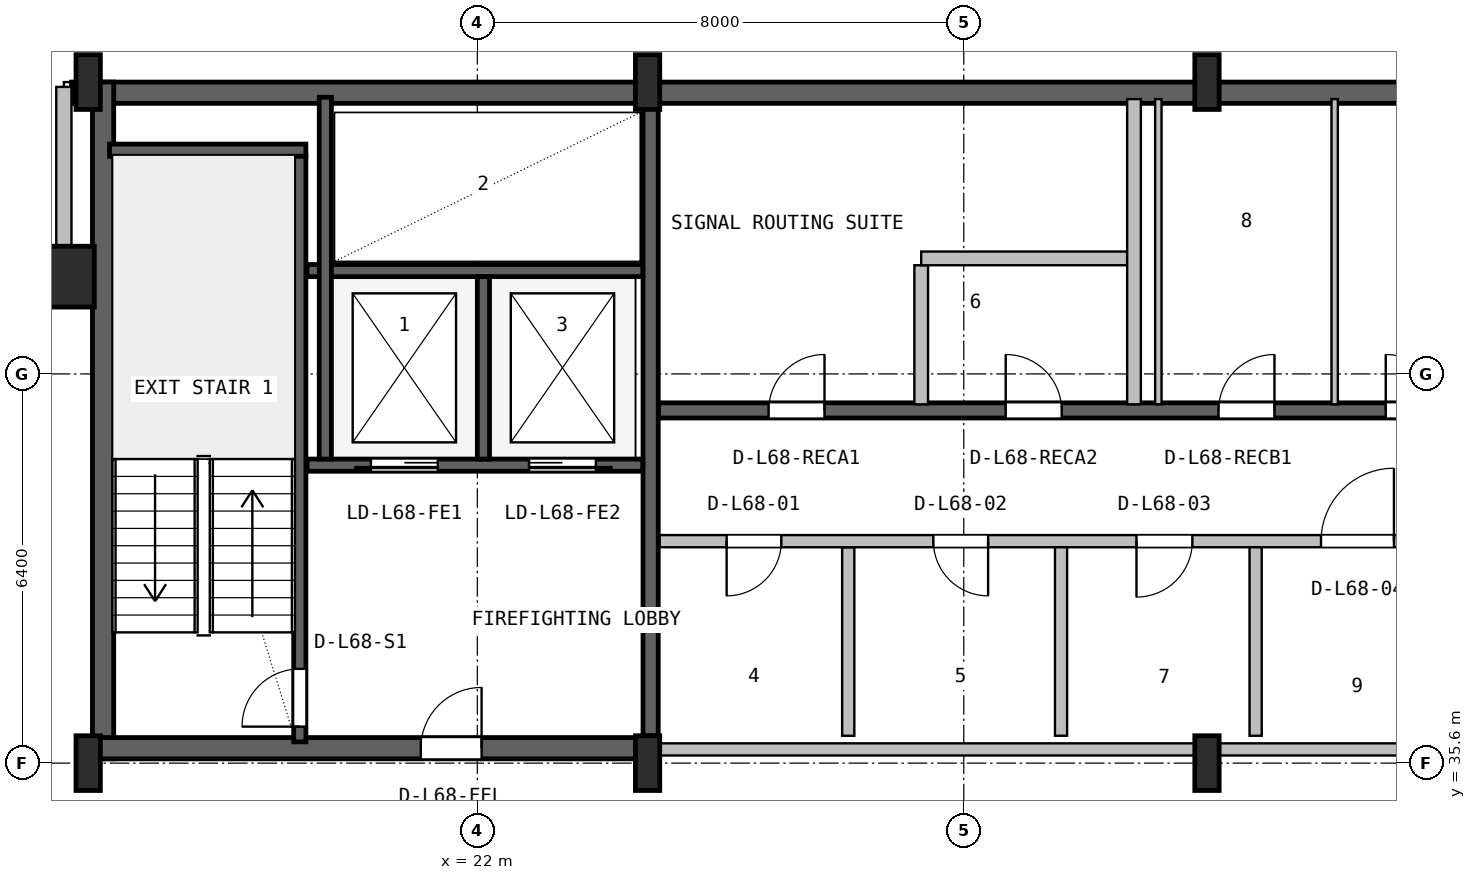
"""IFC4 building model, lengths in metres.
Left out: names, types, materials, properties, quantities, classifications, styles, units other than length and angle.
Written with IfcOpenShell. Run it as: python <this file> out.ifc"""

import sys

from ifc_helpers import new_model, si_unit, direction, frame, frame_2d, origin, origin_2d, place, context, subcontext, project, spatial, rectangle, hollow_rectangle, i_section, extrude, source, transform, mapped, element, fill, save


model = new_model("IFC4")
c1 = context("Model", 3, precision=1e-05, world=origin(), true_north=direction((0.0, 1.0)))
c2 = subcontext(c1, "Body", "Model", "MODEL_VIEW")
j1 = project(units=[si_unit("LENGTHUNIT", "METRE"), si_unit("PLANEANGLEUNIT", "RADIAN")], contexts=[c1])
p1 = place(None, origin())
s1 = spatial("IfcSite", under=j1, at=p1, CompositionType="ELEMENT")
p2 = place(p1, origin())
s2 = spatial("IfcBuilding", under=s1, at=p2, CompositionType="ELEMENT")
p3 = place(p2, frame((0.0, 0.0, 273.6)))
s3 = spatial("IfcBuildingStorey", under=s2, at=p3, CompositionType="ELEMENT", Elevation=273.6)
p4 = place(p3, frame((15.325, 46.625, 0.0), z_axis=(0.0, 0.0, 1.0), x_axis=(1.0, 0.0, 0.0)))
e1 = element("IfcWall", 1, at=p4, inside=s3, PredefinedType="SHEAR", context=c2, shape_type="SweptSolid", body=[
    extrude(rectangle(XDim=37.35, YDim=0.35, at=frame_2d((18.675, 0.0))), origin(), (0.0, 0.0, 1.0), 3.55),
])
p5 = place(p3, frame((15.845, 35.67, 0.0), z_axis=(0.0, 0.0, 1.0), x_axis=(0.0, 1.0, 0.0)))
e2 = element("IfcWall", 2, at=p5, inside=s3, PredefinedType="SHEAR", context=c2, shape_type="SweptSolid", body=[
    extrude(rectangle(XDim=11.13, YDim=0.35, at=frame_2d((5.565, 0.0))), origin(), (0.0, 0.0, 1.0), 3.55),
])
p6 = place(p3, frame((15.67, 35.845, 0.0), z_axis=(0.0, 0.0, 1.0), x_axis=(1.0, 0.0, 0.0)))
e3 = element("IfcWall", 3, at=p6, inside=s3, PredefinedType="SHEAR", context=c2, shape_type="SweptSolid", body=[
    extrude(rectangle(XDim=9.13, YDim=0.35, at=frame_2d((4.565, 0.0))), origin(), (0.0, 0.0, 1.0), 3.55),
])
p7 = place(p6, frame((5.4, 0.0, 0.0)))
e4 = element("IfcOpeningElement", 4, at=p7, cuts=e3, PredefinedType="OPENING", context=c2, shape_type="SweptSolid", body=[
    extrude(rectangle(XDim=1.0, YDim=2.1, at=frame_2d((0.5, 1.05))), frame((0.0, 0.185, 0.0), z_axis=(0.0, -1.0, 0.0), x_axis=(1.0, 0.0, 0.0)), (0.0, 0.0, 1.0), 0.37),
])
m1 = source(origin(), c2, "Body", "SweptSolid", [
    extrude(i_section(OverallWidth=0.4, OverallDepth=0.9, WebThickness=0.016, FlangeThickness=0.028, FilletRadius=0.016, at=origin_2d()), origin(), (0.0, 0.0, 1.0), 3.8),
])
for number, where, z_axis, x_axis in (
    (5, (15.6, 35.6, 0.0), (0.0, 0.0, 1.0), (1.0, 0.0, 0.0)),
    (6, (15.6, 46.8, 0.0), (0.0, 0.0, 1.0), (1.0, 0.0, 0.0)),
    (7, (24.8, 35.6, 0.0), (0.0, 0.0, 1.0), (1.0, 0.0, 0.0)),
    (8, (24.8, 46.8, 0.0), (0.0, 0.0, 1.0), (1.0, 0.0, 0.0)),
    (9, (34.0, 35.6, 0.0), (0.0, 0.0, 1.0), (1.0, 0.0, 0.0)),
    (10, (34.0, 46.8, 0.0), (0.0, 0.0, 1.0), (1.0, 0.0, 0.0)),
):
    element("IfcColumn", number, at=place(p3, frame(where, z_axis=z_axis, x_axis=x_axis)), inside=s3, PredefinedType="COLUMN", context=c2, shape_type="MappedRepresentation", body=[
        mapped(m1, transform((0.0, 0.0, 0.0), x_axis=(1.0, 0.0, 0.0), y_axis=(0.0, 1.0, 0.0), z_axis=(0.0, 0.0, 1.0), scale=1.0)),
    ])
m2 = source(origin(), c2, "Body", "SweptSolid", [
    extrude(hollow_rectangle(XDim=1.0, YDim=1.0, WallThickness=0.04, at=origin_2d()), origin(), (0.0, 0.0, 1.0), 3.8),
])
p8 = place(p3, frame((15.2, 43.6, 0.0), z_axis=(0.0, 0.0, 1.0), x_axis=(1.0, 0.0, 0.0)))
e11 = element("IfcColumn", 11, at=p8, inside=s3, PredefinedType="COLUMN", context=c2, shape_type="MappedRepresentation", body=[
    mapped(m2, transform((0.0, 0.0, 0.0), x_axis=(1.0, 0.0, 0.0), y_axis=(0.0, 1.0, 0.0), z_axis=(0.0, 0.0, 1.0), scale=1.0)),
])
p9 = place(p3, frame((12.08, 43.6, 0.0), z_axis=(0.0, 0.0, 1.0), x_axis=(1.0, 0.0, 0.0)))
e12 = element("IfcWall", 12, at=p9, inside=s3, PredefinedType="SOLIDWALL", context=c2, shape_type="SweptSolid", body=[
    extrude(rectangle(XDim=2.99, YDim=0.25, at=frame_2d((1.495, 0.0))), origin(), (0.0, 0.0, 1.0), 3.53),
])
p10 = place(p3, frame((15.2, 43.52, 0.0), z_axis=(0.0, 0.0, 1.0), x_axis=(0.0, 1.0, 0.0)))
e13 = element("IfcWall", 13, at=p10, inside=s3, PredefinedType="SOLIDWALL", context=c2, shape_type="SweptSolid", body=[
    extrude(rectangle(XDim=3.2, YDim=0.25, at=frame_2d((1.6, 0.0))), origin(), (0.0, 0.0, 1.0), 3.171),
])
p11 = place(p3, frame((19.08, 35.95, 0.0), z_axis=(0.0, 0.0, 1.0), x_axis=(0.0, 1.0, 0.0)))
e14 = element("IfcWall", 14, at=p11, inside=s3, PredefinedType="SHEAR", context=c2, shape_type="SweptSolid", body=[
    extrude(rectangle(XDim=9.65, YDim=0.2, at=frame_2d((4.825, 0.0))), origin(), (0.0, 0.0, 1.0), 3.55),
])
p12 = place(p11, frame((0.25, 0.0, 0.0)))
e15 = element("IfcOpeningElement", 15, at=p12, cuts=e14, PredefinedType="OPENING", context=c2, shape_type="SweptSolid", body=[
    extrude(rectangle(XDim=0.95, YDim=2.1, at=frame_2d((0.475, 1.05))), frame((0.0, 0.11, 0.0), z_axis=(0.0, -1.0, 0.0), x_axis=(1.0, 0.0, 0.0)), (0.0, 0.0, 1.0), 0.22),
])
p13 = place(p3, frame((15.95, 45.68, 0.0), z_axis=(0.0, 0.0, 1.0), x_axis=(1.0, 0.0, 0.0)))
e16 = element("IfcWall", 16, at=p13, inside=s3, PredefinedType="SHEAR", context=c2, shape_type="SweptSolid", body=[
    extrude(rectangle(XDim=3.23, YDim=0.2, at=frame_2d((1.615, 0.0))), origin(), (0.0, 0.0, 1.0), 3.55),
])
p14 = place(p3, frame((24.85, 36.05, 0.0), z_axis=(0.0, 0.0, 1.0), x_axis=(0.0, 1.0, 0.0)))
e17 = element("IfcWall", 17, at=p14, inside=s3, PredefinedType="SHEAR", context=c2, shape_type="SweptSolid", body=[
    extrude(rectangle(XDim=10.45, YDim=0.25, at=frame_2d((5.225, 0.0))), origin(), (0.0, 0.0, 1.0), 3.55),
])
p15 = place(p3, frame((19.2, 40.5, 0.0), z_axis=(0.0, 0.0, 1.0), x_axis=(1.0, 0.0, 0.0)))
e18 = element("IfcWall", 18, at=p15, inside=s3, PredefinedType="SHEAR", context=c2, shape_type="SweptSolid", body=[
    extrude(rectangle(XDim=5.52, YDim=0.2, at=frame_2d((2.76, 0.0))), origin(), (0.0, 0.0, 1.0), 3.55),
])
p16 = place(p15, frame((1.05, 0.0, 0.0)))
e19 = element("IfcOpeningElement", 19, at=p16, cuts=e18, PredefinedType="OPENING", context=c2, shape_type="SweptSolid", body=[
    extrude(rectangle(XDim=1.1, YDim=2.18, at=frame_2d((0.55, 1.09))), frame((0.0, 0.11, 0.0), z_axis=(0.0, -1.0, 0.0), x_axis=(1.0, 0.0, 0.0)), (0.0, 0.0, 1.0), 0.22),
])
p17 = place(p15, frame((3.65, 0.0, 0.0)))
e20 = element("IfcOpeningElement", 20, at=p17, cuts=e18, PredefinedType="OPENING", context=c2, shape_type="SweptSolid", body=[
    extrude(rectangle(XDim=1.1, YDim=2.18, at=frame_2d((0.55, 1.09))), frame((0.0, 0.11, 0.0), z_axis=(0.0, -1.0, 0.0), x_axis=(1.0, 0.0, 0.0)), (0.0, 0.0, 1.0), 0.22),
])
p18 = place(p3, frame((19.2, 43.7, 0.0), z_axis=(0.0, 0.0, 1.0), x_axis=(1.0, 0.0, 0.0)))
e21 = element("IfcWall", 21, at=p18, inside=s3, PredefinedType="SHEAR", context=c2, shape_type="SweptSolid", body=[
    extrude(rectangle(XDim=5.52, YDim=0.2, at=frame_2d((2.76, 0.0))), origin(), (0.0, 0.0, 1.0), 3.55),
])
p19 = place(p3, frame((22.1, 40.6, 0.0), z_axis=(0.0, 0.0, 1.0), x_axis=(0.0, 1.0, 0.0)))
e22 = element("IfcWall", 22, at=p19, inside=s3, PredefinedType="SHEAR", context=c2, shape_type="SweptSolid", body=[
    extrude(rectangle(XDim=3.0, YDim=0.2, at=frame_2d((1.5, 0.0))), origin(), (0.0, 0.0, 1.0), 3.55),
])
p20 = place(p3, frame((19.5, 40.6, 0.0), z_axis=(0.0, 0.0, 1.0), x_axis=(0.0, 1.0, 0.0)))
e23 = element("IfcWall", 23, at=p20, inside=s3, PredefinedType="SHEAR", context=c2, shape_type="SweptSolid", body=[
    extrude(rectangle(XDim=5.95, YDim=0.2, at=frame_2d((2.975, 0.0))), origin(), (0.0, 0.0, 1.0), 3.55),
])
p21 = place(p3, frame((24.98, 41.4, 0.0), z_axis=(0.0, 0.0, 1.0), x_axis=(1.0, 0.0, 0.0)))
e24 = element("IfcWall", 24, at=p21, inside=s3, PredefinedType="SHEAR", context=c2, shape_type="SweptSolid", body=[
    extrude(rectangle(XDim=23.82, YDim=0.25, at=frame_2d((11.91, 0.0))), origin(), (0.0, 0.0, 1.0), 3.55),
])
p22 = place(p21, frame((16.87, 0.0, 0.0)))
e25 = element("IfcOpeningElement", 25, at=p22, cuts=e24, PredefinedType="OPENING", context=c2, shape_type="SweptSolid", body=[
    extrude(rectangle(XDim=1.1, YDim=2.18, at=frame_2d((0.55, 1.09))), frame((0.0, 0.135, 0.0), z_axis=(0.0, -1.0, 0.0), x_axis=(1.0, 0.0, 0.0)), (0.0, 0.0, 1.0), 0.27),
])
p23 = place(p21, frame((19.47, 0.0, 0.0)))
e26 = element("IfcOpeningElement", 26, at=p23, cuts=e24, PredefinedType="OPENING", context=c2, shape_type="SweptSolid", body=[
    extrude(rectangle(XDim=1.1, YDim=2.18, at=frame_2d((0.55, 1.09))), frame((0.0, 0.135, 0.0), z_axis=(0.0, -1.0, 0.0), x_axis=(1.0, 0.0, 0.0)), (0.0, 0.0, 1.0), 0.27),
])
p24 = place(p21, frame((22.07, 0.0, 0.0)))
e27 = element("IfcOpeningElement", 27, at=p24, cuts=e24, PredefinedType="OPENING", context=c2, shape_type="SweptSolid", body=[
    extrude(rectangle(XDim=1.1, YDim=2.18, at=frame_2d((0.55, 1.09))), frame((0.0, 0.135, 0.0), z_axis=(0.0, -1.0, 0.0), x_axis=(1.0, 0.0, 0.0)), (0.0, 0.0, 1.0), 0.27),
])
p25 = place(p21, frame((1.81, 0.0, 0.0)))
e28 = element("IfcOpeningElement", 28, at=p25, cuts=e24, PredefinedType="OPENING", context=c2, shape_type="SweptSolid", body=[
    extrude(rectangle(XDim=0.92, YDim=2.08, at=frame_2d((0.46, 1.04))), frame((0.0, 0.135, 0.0), z_axis=(0.0, -1.0, 0.0), x_axis=(1.0, 0.0, 0.0)), (0.0, 0.0, 1.0), 0.27),
])
p26 = place(p21, frame((5.71, 0.0, 0.0)))
e29 = element("IfcOpeningElement", 29, at=p26, cuts=e24, PredefinedType="OPENING", context=c2, shape_type="SweptSolid", body=[
    extrude(rectangle(XDim=0.92, YDim=2.08, at=frame_2d((0.46, 1.04))), frame((0.0, 0.135, 0.0), z_axis=(0.0, -1.0, 0.0), x_axis=(1.0, 0.0, 0.0)), (0.0, 0.0, 1.0), 0.27),
])
p27 = place(p21, frame((9.21, 0.0, 0.0)))
e30 = element("IfcOpeningElement", 30, at=p27, cuts=e24, PredefinedType="OPENING", context=c2, shape_type="SweptSolid", body=[
    extrude(rectangle(XDim=0.92, YDim=2.08, at=frame_2d((0.46, 1.04))), frame((0.0, 0.135, 0.0), z_axis=(0.0, -1.0, 0.0), x_axis=(1.0, 0.0, 0.0)), (0.0, 0.0, 1.0), 0.27),
])
p28 = place(p21, frame((11.96, 0.0, 0.0)))
e31 = element("IfcOpeningElement", 31, at=p28, cuts=e24, PredefinedType="OPENING", context=c2, shape_type="SweptSolid", body=[
    extrude(rectangle(XDim=0.92, YDim=2.08, at=frame_2d((0.46, 1.04))), frame((0.0, 0.135, 0.0), z_axis=(0.0, -1.0, 0.0), x_axis=(1.0, 0.0, 0.0)), (0.0, 0.0, 1.0), 0.27),
])
p29 = place(p21, frame((14.31, 0.0, 0.0)))
e32 = element("IfcOpeningElement", 32, at=p29, cuts=e24, PredefinedType="OPENING", context=c2, shape_type="SweptSolid", body=[
    extrude(rectangle(XDim=0.92, YDim=2.08, at=frame_2d((0.46, 1.04))), frame((0.0, 0.135, 0.0), z_axis=(0.0, -1.0, 0.0), x_axis=(1.0, 0.0, 0.0)), (0.0, 0.0, 1.0), 0.27),
])
p30 = place(p3, frame((25.0, 35.825, 0.0), z_axis=(0.0, 0.0, 1.0), x_axis=(1.0, 0.0, 0.0)))
e33 = element("IfcWall", 33, at=p30, inside=s3, PredefinedType="SOLIDWALL", context=c2, shape_type="SweptSolid", body=[
    extrude(rectangle(XDim=12.95, YDim=0.2, at=frame_2d((6.475, 0.0))), origin(), (0.0, 0.0, 1.0), 2.575),
])
p31 = place(p3, frame((28.1, 36.05, 0.0), z_axis=(0.0, 0.0, 1.0), x_axis=(0.0, 1.0, 0.0)))
e34 = element("IfcWall", 34, at=p31, inside=s3, PredefinedType="PLUMBINGWALL", context=c2, shape_type="SweptSolid", body=[
    extrude(rectangle(XDim=3.1, YDim=0.2, at=frame_2d((1.55, 0.0))), origin(), (0.0, 0.0, 1.0), 3.53),
])
p32 = place(p3, frame((25.0, 39.25, 0.0), z_axis=(0.0, 0.0, 1.0), x_axis=(1.0, 0.0, 0.0)))
e35 = element("IfcWall", 35, at=p32, inside=s3, PredefinedType="SOLIDWALL", context=c2, shape_type="SweptSolid", body=[
    extrude(rectangle(XDim=12.95, YDim=0.2, at=frame_2d((6.475, 0.0))), origin(), (0.0, 0.0, 1.0), 3.53),
])
p33 = place(p32, frame((1.1, 0.0, 0.0)))
e36 = element("IfcOpeningElement", 36, at=p33, cuts=e35, PredefinedType="OPENING", context=c2, shape_type="SweptSolid", body=[
    extrude(rectangle(XDim=0.9, YDim=2.06, at=frame_2d((0.45, 1.03))), frame((0.0, 0.11, 0.0), z_axis=(0.0, -1.0, 0.0), x_axis=(1.0, 0.0, 0.0)), (0.0, 0.0, 1.0), 0.22),
])
p34 = place(p32, frame((4.5, 0.0, 0.0)))
e37 = element("IfcOpeningElement", 37, at=p34, cuts=e35, PredefinedType="OPENING", context=c2, shape_type="SweptSolid", body=[
    extrude(rectangle(XDim=0.9, YDim=2.06, at=frame_2d((0.45, 1.03))), frame((0.0, 0.11, 0.0), z_axis=(0.0, -1.0, 0.0), x_axis=(1.0, 0.0, 0.0)), (0.0, 0.0, 1.0), 0.22),
])
p35 = place(p32, frame((7.84, 0.0, 0.0)))
e38 = element("IfcOpeningElement", 38, at=p35, cuts=e35, PredefinedType="OPENING", context=c2, shape_type="SweptSolid", body=[
    extrude(rectangle(XDim=0.92, YDim=2.08, at=frame_2d((0.46, 1.04))), frame((0.0, 0.11, 0.0), z_axis=(0.0, -1.0, 0.0), x_axis=(1.0, 0.0, 0.0)), (0.0, 0.0, 1.0), 0.22),
])
p36 = place(p32, frame((10.875, 0.0, 0.0)))
e39 = element("IfcOpeningElement", 39, at=p36, cuts=e35, PredefinedType="OPENING", context=c2, shape_type="SweptSolid", body=[
    extrude(rectangle(XDim=1.2, YDim=2.1, at=frame_2d((0.6, 1.05))), frame((0.0, 0.11, 0.0), z_axis=(0.0, -1.0, 0.0), x_axis=(1.0, 0.0, 0.0)), (0.0, 0.0, 1.0), 0.22),
])
p37 = place(p3, frame((31.6, 36.05, 0.0), z_axis=(0.0, 0.0, 1.0), x_axis=(0.0, 1.0, 0.0)))
e40 = element("IfcWall", 40, at=p37, inside=s3, PredefinedType="PLUMBINGWALL", context=c2, shape_type="SweptSolid", body=[
    extrude(rectangle(XDim=3.1, YDim=0.2, at=frame_2d((1.55, 0.0))), origin(), (0.0, 0.0, 1.0), 3.53),
])
p38 = place(p3, frame((34.8, 36.05, 0.0), z_axis=(0.0, 0.0, 1.0), x_axis=(0.0, 1.0, 0.0)))
e41 = element("IfcWall", 41, at=p38, inside=s3, PredefinedType="SOLIDWALL", context=c2, shape_type="SweptSolid", body=[
    extrude(rectangle(XDim=3.1, YDim=0.2, at=frame_2d((1.55, 0.0))), origin(), (0.0, 0.0, 1.0), 3.53),
])
p39 = place(p3, frame((29.3, 41.5, 0.0), z_axis=(0.0, 0.0, 1.0), x_axis=(0.0, 1.0, 0.0)))
e42 = element("IfcWall", 42, at=p39, inside=s3, PredefinedType="PARTITIONING", context=c2, shape_type="SweptSolid", body=[
    extrude(rectangle(XDim=2.288, YDim=0.225, at=frame_2d((1.144, 0.0))), origin(), (0.0, 0.0, 1.0), 3.53),
])
p40 = place(p3, frame((29.3, 43.9, 0.0), z_axis=(0.0, 0.0, 1.0), x_axis=(1.0, 0.0, 0.0)))
e43 = element("IfcWall", 43, at=p40, inside=s3, PredefinedType="PARTITIONING", context=c2, shape_type="SweptSolid", body=[
    extrude(rectangle(XDim=3.5, YDim=0.225, at=frame_2d((1.75, 0.0))), origin(), (0.0, 0.0, 1.0), 3.53),
])
p41 = place(p3, frame((32.8, 41.5, 0.0), z_axis=(0.0, 0.0, 1.0), x_axis=(0.0, 1.0, 0.0)))
e44 = element("IfcWall", 44, at=p41, inside=s3, PredefinedType="PARTITIONING", context=c2, shape_type="SweptSolid", body=[
    extrude(rectangle(XDim=5.02, YDim=0.225, at=frame_2d((2.51, 0.0))), origin(), (0.0, 0.0, 1.0), 3.53),
])
for number, where, z_axis, x_axis in (
    (45, (36.1, 41.5, 0.0), (0.0, 0.0, 1.0), (0.0, 1.0, 0.0)),
    (46, (33.2, 41.5, 0.0), (0.0, 0.0, 1.0), (0.0, 1.0, 0.0)),
):
    element("IfcWall", number, at=place(p3, frame(where, z_axis=z_axis, x_axis=x_axis)), inside=s3, PredefinedType="PARTITIONING", context=c2, shape_type="SweptSolid", body=[
        extrude(rectangle(XDim=5.02, YDim=0.105, at=frame_2d((2.51, 0.0))), origin(), (0.0, 0.0, 1.0), 3.53),
    ])
m3 = source(origin(), c2, "Body", "SweptSolid", [
    extrude(rectangle(XDim=0.95, YDim=2.1, at=frame_2d((0.475, 1.05))), frame((0.0, 0.025, 0.0), z_axis=(0.0, -1.0, 0.0), x_axis=(1.0, 0.0, 0.0)), (0.0, 0.0, 1.0), 0.05),
])
p42 = place(p12, origin())
e47 = element("IfcDoor", 47, at=p42, inside=s3, OperationType="SINGLE_SWING_LEFT", PredefinedType="DOOR", context=c2, shape_type="MappedRepresentation", body=[
    mapped(m3, transform((0.0, 0.0, 0.0), x_axis=(1.0, 0.0, 0.0), y_axis=(0.0, 1.0, 0.0), z_axis=(0.0, 0.0, 1.0), scale=1.0)),
])
fill(e15, e47)
m4 = source(origin(), c2, "Body", "SweptSolid", [
    extrude(rectangle(XDim=1.0, YDim=2.1, at=frame_2d((0.5, 1.05))), frame((0.0, 0.025, 0.0), z_axis=(0.0, -1.0, 0.0), x_axis=(1.0, 0.0, 0.0)), (0.0, 0.0, 1.0), 0.05),
])
p43 = place(p7, origin())
e48 = element("IfcDoor", 48, at=p43, inside=s3, OperationType="SINGLE_SWING_RIGHT", PredefinedType="DOOR", context=c2, shape_type="MappedRepresentation", body=[
    mapped(m4, transform((0.0, 0.0, 0.0), x_axis=(1.0, 0.0, 0.0), y_axis=(0.0, 1.0, 0.0), z_axis=(0.0, 0.0, 1.0), scale=1.0)),
])
fill(e4, e48)
m5 = source(origin(), c2, "Body", "SweptSolid", [
    extrude(rectangle(XDim=1.1, YDim=2.18, at=frame_2d((0.55, 1.09))), frame((0.0, 0.025, 0.0), z_axis=(0.0, -1.0, 0.0), x_axis=(1.0, 0.0, 0.0)), (0.0, 0.0, 1.0), 0.05),
])
p44 = place(p16, frame((1.1, 0.0, 0.0), z_axis=(0.0, 0.0, 1.0), x_axis=(-1.0, 0.0, 0.0)))
e49 = element("IfcDoor", 49, at=p44, inside=s3, OperationType="SLIDING_TO_LEFT", PredefinedType="DOOR", context=c2, shape_type="MappedRepresentation", body=[
    mapped(m5, transform((0.0, 0.0, 0.0), x_axis=(1.0, 0.0, 0.0), y_axis=(0.0, 1.0, 0.0), z_axis=(0.0, 0.0, 1.0), scale=1.0)),
])
fill(e19, e49)
p45 = place(p17, frame((1.1, 0.0, 0.0), z_axis=(0.0, 0.0, 1.0), x_axis=(-1.0, 0.0, 0.0)))
e50 = element("IfcDoor", 50, at=p45, inside=s3, OperationType="SLIDING_TO_RIGHT", PredefinedType="DOOR", context=c2, shape_type="MappedRepresentation", body=[
    mapped(m5, transform((0.0, 0.0, 0.0), x_axis=(1.0, 0.0, 0.0), y_axis=(0.0, 1.0, 0.0), z_axis=(0.0, 0.0, 1.0), scale=1.0)),
])
fill(e20, e50)
m6 = source(origin(), c2, "Body", "SweptSolid", [
    extrude(rectangle(XDim=0.92, YDim=2.08, at=frame_2d((0.46, 1.04))), frame((0.0, 0.025, 0.0), z_axis=(0.0, -1.0, 0.0), x_axis=(1.0, 0.0, 0.0)), (0.0, 0.0, 1.0), 0.05),
])
p46 = place(p25, origin())
e51 = element("IfcDoor", 51, at=p46, inside=s3, OperationType="SINGLE_SWING_RIGHT", PredefinedType="DOOR", context=c2, shape_type="MappedRepresentation", body=[
    mapped(m6, transform((0.0, 0.0, 0.0), x_axis=(1.0, 0.0, 0.0), y_axis=(0.0, 1.0, 0.0), z_axis=(0.0, 0.0, 1.0), scale=1.0)),
])
fill(e28, e51)
p47 = place(p26, origin())
e52 = element("IfcDoor", 52, at=p47, inside=s3, OperationType="SINGLE_SWING_LEFT", PredefinedType="DOOR", context=c2, shape_type="MappedRepresentation", body=[
    mapped(m6, transform((0.0, 0.0, 0.0), x_axis=(1.0, 0.0, 0.0), y_axis=(0.0, 1.0, 0.0), z_axis=(0.0, 0.0, 1.0), scale=1.0)),
])
fill(e29, e52)
p48 = place(p27, origin())
e53 = element("IfcDoor", 53, at=p48, inside=s3, OperationType="SINGLE_SWING_RIGHT", PredefinedType="DOOR", context=c2, shape_type="MappedRepresentation", body=[
    mapped(m6, transform((0.0, 0.0, 0.0), x_axis=(1.0, 0.0, 0.0), y_axis=(0.0, 1.0, 0.0), z_axis=(0.0, 0.0, 1.0), scale=1.0)),
])
fill(e30, e53)
p49 = place(p28, origin())
e54 = element("IfcDoor", 54, at=p49, inside=s3, OperationType="SINGLE_SWING_LEFT", PredefinedType="DOOR", context=c2, shape_type="MappedRepresentation", body=[
    mapped(m6, transform((0.0, 0.0, 0.0), x_axis=(1.0, 0.0, 0.0), y_axis=(0.0, 1.0, 0.0), z_axis=(0.0, 0.0, 1.0), scale=1.0)),
])
fill(e31, e54)
m7 = source(origin(), c2, "Body", "SweptSolid", [
    extrude(rectangle(XDim=0.9, YDim=2.06, at=frame_2d((0.45, 1.03))), frame((0.0, 0.025, 0.0), z_axis=(0.0, -1.0, 0.0), x_axis=(1.0, 0.0, 0.0)), (0.0, 0.0, 1.0), 0.05),
])
p50 = place(p33, frame((0.9, 0.0, 0.0), z_axis=(0.0, 0.0, 1.0), x_axis=(-1.0, 0.0, 0.0)))
e55 = element("IfcDoor", 55, at=p50, inside=s3, OperationType="SINGLE_SWING_LEFT", PredefinedType="DOOR", context=c2, shape_type="MappedRepresentation", body=[
    mapped(m7, transform((0.0, 0.0, 0.0), x_axis=(1.0, 0.0, 0.0), y_axis=(0.0, 1.0, 0.0), z_axis=(0.0, 0.0, 1.0), scale=1.0)),
])
fill(e36, e55)
p51 = place(p34, frame((0.9, 0.0, 0.0), z_axis=(0.0, 0.0, 1.0), x_axis=(-1.0, 0.0, 0.0)))
e56 = element("IfcDoor", 56, at=p51, inside=s3, OperationType="SINGLE_SWING_RIGHT", PredefinedType="DOOR", context=c2, shape_type="MappedRepresentation", body=[
    mapped(m7, transform((0.0, 0.0, 0.0), x_axis=(1.0, 0.0, 0.0), y_axis=(0.0, 1.0, 0.0), z_axis=(0.0, 0.0, 1.0), scale=1.0)),
])
fill(e37, e56)
p52 = place(p35, frame((0.92, 0.0, 0.0), z_axis=(0.0, 0.0, 1.0), x_axis=(-1.0, 0.0, 0.0)))
e57 = element("IfcDoor", 57, at=p52, inside=s3, OperationType="SINGLE_SWING_LEFT", PredefinedType="DOOR", context=c2, shape_type="MappedRepresentation", body=[
    mapped(m6, transform((0.0, 0.0, 0.0), x_axis=(1.0, 0.0, 0.0), y_axis=(0.0, 1.0, 0.0), z_axis=(0.0, 0.0, 1.0), scale=1.0)),
])
fill(e38, e57)
m8 = source(origin(), c2, "Body", "SweptSolid", [
    extrude(rectangle(XDim=1.2, YDim=2.1, at=frame_2d((0.6, 1.05))), frame((0.0, 0.025, 0.0), z_axis=(0.0, -1.0, 0.0), x_axis=(1.0, 0.0, 0.0)), (0.0, 0.0, 1.0), 0.05),
])
p53 = place(p36, origin())
e58 = element("IfcDoor", 58, at=p53, inside=s3, OperationType="SINGLE_SWING_RIGHT", PredefinedType="DOOR", context=c2, shape_type="MappedRepresentation", body=[
    mapped(m8, transform((0.0, 0.0, 0.0), x_axis=(1.0, 0.0, 0.0), y_axis=(0.0, 1.0, 0.0), z_axis=(0.0, 0.0, 1.0), scale=1.0)),
])
fill(e39, e58)
save(model, sys.argv[1])
